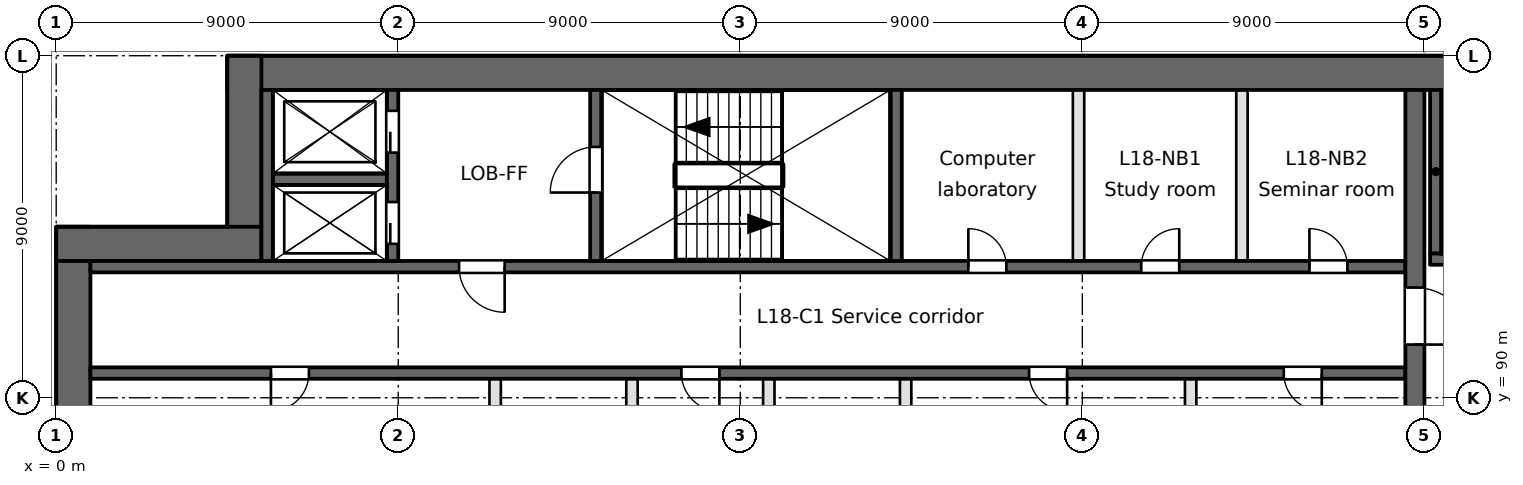
"""IFC4 building model, lengths in metres.
Left out: names, types, materials, properties, quantities, classifications, styles, units other than length and angle.
Written with IfcOpenShell. Run it as: python <this file> out.ifc"""

import sys

from ifc_helpers import new_model, si_unit, direction, frame, frame_2d, origin, place, context, subcontext, project, spatial, rectangle, extrude, element, fill, save


model = new_model("IFC4")
c1 = context("Model", 3, precision=1e-05, world=origin(), true_north=direction((0.0, 1.0)))
c2 = subcontext(c1, "Body", "Model", "MODEL_VIEW")
j1 = project(units=[si_unit("LENGTHUNIT", "METRE"), si_unit("PLANEANGLEUNIT", "RADIAN")], contexts=[c1])
p1 = place(None, origin())
s1 = spatial("IfcSite", under=j1, at=p1, CompositionType="ELEMENT")
p2 = place(p1, origin())
s2 = spatial("IfcBuilding", under=s1, at=p2, CompositionType="ELEMENT")
p3 = place(p2, frame((0.0, 0.0, 76.5)))
s3 = spatial("IfcBuildingStorey", under=s2, at=p3, CompositionType="ELEMENT", Elevation=76.5)
p4 = place(p3, frame((0.45, 94.5, 0.0), z_axis=(0.0, 0.0, 1.0), x_axis=(0.0, -1.0, 0.0)))
e1 = element("IfcWall", 1, at=p4, inside=s3, PredefinedType="SHEAR", context=c2, shape_type="SweptSolid", body=[
    extrude(rectangle(XDim=66.187, YDim=0.9, at=frame_2d((33.094, 0.0))), origin(), (0.0, 0.0, 1.0), 3.7),
])
p5 = place(p3, frame((94.5, 98.55, 0.0), z_axis=(0.0, 0.0, 1.0), x_axis=(-1.0, 0.0, 0.0)))
e2 = element("IfcWall", 2, at=p5, inside=s3, PredefinedType="SHEAR", context=c2, shape_type="SweptSolid", body=[
    extrude(rectangle(XDim=90.0, YDim=0.9, at=frame_2d((45.0, 0.0))), origin(), (0.0, 0.0, 1.0), 3.25),
])
for number, where, z_axis, x_axis in (
    (3, (4.95, 99.0, 0.0), (0.0, 0.0, 1.0), (0.0, -1.0, 0.0)),
    (4, (5.4, 94.05, 0.0), (0.0, 0.0, 1.0), (-1.0, 0.0, 0.0)),
):
    element("IfcWall", number, at=place(p3, frame(where, z_axis=z_axis, x_axis=x_axis)), inside=s3, PredefinedType="SHEAR", context=c2, shape_type="SweptSolid", body=[
        extrude(rectangle(XDim=5.4, YDim=0.9, at=frame_2d((2.7, 0.0))), origin(), (0.0, 0.0, 1.0), 3.7),
    ])
p6 = place(p3, frame((0.9, 90.65, -0.4), z_axis=(0.0, 0.0, 1.0), x_axis=(1.0, 0.0, 0.0)))
e5 = element("IfcWall", 5, at=p6, inside=s3, PredefinedType="SOLIDWALL", context=c2, shape_type="SweptSolid", body=[
    extrude(rectangle(XDim=34.6, YDim=0.3, at=frame_2d((17.3, 0.0))), origin(), (0.0, 0.0, 1.0), 3.65),
])
p7 = place(p6, frame((4.75, 0.0, 0.4)))
e6 = element("IfcOpeningElement", 6, at=p7, cuts=e5, PredefinedType="OPENING", context=c2, shape_type="SweptSolid", body=[
    extrude(rectangle(XDim=1.0, YDim=2.1, at=frame_2d((0.5, 1.05))), frame((0.0, 0.15, 0.0), z_axis=(0.0, -1.0, 0.0), x_axis=(1.0, 0.0, 0.0)), (0.0, 0.0, 1.0), 0.3),
])
p8 = place(p6, frame((24.7, 0.0, 0.4)))
e7 = element("IfcOpeningElement", 7, at=p8, cuts=e5, PredefinedType="OPENING", context=c2, shape_type="SweptSolid", body=[
    extrude(rectangle(XDim=1.0, YDim=2.1, at=frame_2d((0.5, 1.05))), frame((0.0, 0.15, 0.0), z_axis=(0.0, -1.0, 0.0), x_axis=(1.0, 0.0, 0.0)), (0.0, 0.0, 1.0), 0.3),
])
p9 = place(p6, frame((15.55, 0.0, 0.4)))
e8 = element("IfcOpeningElement", 8, at=p9, cuts=e5, PredefinedType="OPENING", context=c2, shape_type="SweptSolid", body=[
    extrude(rectangle(XDim=1.0, YDim=2.1, at=frame_2d((0.5, 1.05))), frame((0.0, 0.15, 0.0), z_axis=(0.0, -1.0, 0.0), x_axis=(1.0, 0.0, 0.0)), (0.0, 0.0, 1.0), 0.3),
])
p10 = place(p6, frame((31.4, 0.0, 0.4)))
e9 = element("IfcOpeningElement", 9, at=p10, cuts=e5, PredefinedType="OPENING", context=c2, shape_type="SweptSolid", body=[
    extrude(rectangle(XDim=1.0, YDim=2.1, at=frame_2d((0.5, 1.05))), frame((0.0, 0.15, 0.0), z_axis=(0.0, -1.0, 0.0), x_axis=(1.0, 0.0, 0.0)), (0.0, 0.0, 1.0), 0.3),
])
p11 = place(p3, frame((0.9, 93.45, -0.4), z_axis=(0.0, 0.0, 1.0), x_axis=(1.0, 0.0, 0.0)))
e10 = element("IfcWall", 10, at=p11, inside=s3, PredefinedType="SOLIDWALL", context=c2, shape_type="SweptSolid", body=[
    extrude(rectangle(XDim=34.6, YDim=0.3, at=frame_2d((17.3, 0.0))), origin(), (0.0, 0.0, 1.0), 3.65),
])
p12 = place(p11, frame((9.7, 0.0, 0.4)))
e11 = element("IfcOpeningElement", 11, at=p12, cuts=e10, PredefinedType="OPENING", context=c2, shape_type="SweptSolid", body=[
    extrude(rectangle(XDim=1.2, YDim=2.1, at=frame_2d((0.6, 1.05))), frame((0.0, 0.15, 0.0), z_axis=(0.0, -1.0, 0.0), x_axis=(1.0, 0.0, 0.0)), (0.0, 0.0, 1.0), 0.3),
])
p13 = place(p11, frame((23.1, 0.0, 0.4)))
e12 = element("IfcOpeningElement", 12, at=p13, cuts=e10, PredefinedType="OPENING", context=c2, shape_type="SweptSolid", body=[
    extrude(rectangle(XDim=1.0, YDim=2.1, at=frame_2d((0.5, 1.05))), frame((0.0, 0.15, 0.0), z_axis=(0.0, -1.0, 0.0), x_axis=(1.0, 0.0, 0.0)), (0.0, 0.0, 1.0), 0.3),
])
p14 = place(p11, frame((27.65, 0.0, 0.4)))
e13 = element("IfcOpeningElement", 13, at=p14, cuts=e10, PredefinedType="OPENING", context=c2, shape_type="SweptSolid", body=[
    extrude(rectangle(XDim=1.0, YDim=2.1, at=frame_2d((0.5, 1.05))), frame((0.0, 0.15, 0.0), z_axis=(0.0, -1.0, 0.0), x_axis=(1.0, 0.0, 0.0)), (0.0, 0.0, 1.0), 0.3),
])
p15 = place(p11, frame((32.075, 0.0, 0.4)))
e14 = element("IfcOpeningElement", 14, at=p15, cuts=e10, PredefinedType="OPENING", context=c2, shape_type="SweptSolid", body=[
    extrude(rectangle(XDim=1.0, YDim=2.1, at=frame_2d((0.5, 1.05))), frame((0.0, 0.15, 0.0), z_axis=(0.0, -1.0, 0.0), x_axis=(1.0, 0.0, 0.0)), (0.0, 0.0, 1.0), 0.3),
])
p16 = place(p3, frame((36.15, 93.65, -0.4), z_axis=(0.0, 0.0, 1.0), x_axis=(1.0, 0.0, 0.0)))
e15 = element("IfcWall", 15, at=p16, inside=s3, PredefinedType="SOLIDWALL", context=c2, shape_type="SweptSolid", body=[
    extrude(rectangle(XDim=8.2, YDim=0.3, at=frame_2d((4.1, 0.0))), origin(), (0.0, 0.0, 1.0), 3.65),
])
p17 = place(p16, frame((0.7, 0.0, 0.4)))
e16 = element("IfcOpeningElement", 16, at=p17, cuts=e15, PredefinedType="OPENING", context=c2, shape_type="SweptSolid", body=[
    extrude(rectangle(XDim=1.2, YDim=2.1, at=frame_2d((0.6, 1.05))), frame((0.0, 0.15, 0.0), z_axis=(0.0, -1.0, 0.0), x_axis=(1.0, 0.0, 0.0)), (0.0, 0.0, 1.0), 0.3),
])
p18 = place(p3, frame((5.7, 95.75, -0.4), z_axis=(0.0, 0.0, 1.0), x_axis=(1.0, 0.0, 0.0)))
e17 = element("IfcWall", 17, at=p18, inside=s3, PredefinedType="SOLIDWALL", context=c2, shape_type="SweptSolid", body=[
    extrude(rectangle(XDim=3.0, YDim=0.3, at=frame_2d((1.5, 0.0))), origin(), (0.0, 0.0, 1.0), 3.65),
])
p19 = place(p3, frame((5.55, 93.6, -0.4), z_axis=(0.0, 0.0, 1.0), x_axis=(0.0, 1.0, 0.0)))
e18 = element("IfcWall", 18, at=p19, inside=s3, PredefinedType="SOLIDWALL", context=c2, shape_type="SweptSolid", body=[
    extrude(rectangle(XDim=4.5, YDim=0.3, at=frame_2d((2.25, 0.0))), origin(), (0.0, 0.0, 1.0), 3.65),
])
p20 = place(p3, frame((8.85, 93.6, -0.4), z_axis=(0.0, 0.0, 1.0), x_axis=(0.0, 1.0, 0.0)))
e19 = element("IfcWall", 19, at=p20, inside=s3, PredefinedType="SOLIDWALL", context=c2, shape_type="SweptSolid", body=[
    extrude(rectangle(XDim=4.5, YDim=0.3, at=frame_2d((2.25, 0.0))), origin(), (0.0, 0.0, 1.0), 3.65),
])
p21 = place(p20, frame((0.45, 0.0, 0.4)))
e20 = element("IfcOpeningElement", 20, at=p21, cuts=e19, PredefinedType="OPENING", context=c2, shape_type="SweptSolid", body=[
    extrude(rectangle(XDim=1.1, YDim=2.1, at=frame_2d((0.55, 1.05))), frame((0.0, 0.15, 0.0), z_axis=(0.0, -1.0, 0.0), x_axis=(1.0, 0.0, 0.0)), (0.0, 0.0, 1.0), 0.3),
])
p22 = place(p20, frame((2.85, 0.0, 0.4)))
e21 = element("IfcOpeningElement", 21, at=p22, cuts=e19, PredefinedType="OPENING", context=c2, shape_type="SweptSolid", body=[
    extrude(rectangle(XDim=1.1, YDim=2.1, at=frame_2d((0.55, 1.05))), frame((0.0, 0.15, 0.0), z_axis=(0.0, -1.0, 0.0), x_axis=(1.0, 0.0, 0.0)), (0.0, 0.0, 1.0), 0.3),
])
p23 = place(p3, frame((11.55, 87.95, 0.0), z_axis=(0.0, 0.0, 1.0), x_axis=(0.0, 1.0, 0.0)))
e22 = element("IfcWall", 22, at=p23, inside=s3, PredefinedType="PARTITIONING", context=c2, shape_type="SweptSolid", body=[
    extrude(rectangle(XDim=2.55, YDim=0.3, at=frame_2d((1.275, 0.0))), origin(), (0.0, 0.0, 1.0), 3.25),
])
p24 = place(p3, frame((14.2, 93.6, -0.4), z_axis=(0.0, 0.0, 1.0), x_axis=(0.0, 1.0, 0.0)))
e23 = element("IfcWall", 23, at=p24, inside=s3, PredefinedType="SOLIDWALL", context=c2, shape_type="SweptSolid", body=[
    extrude(rectangle(XDim=4.5, YDim=0.3, at=frame_2d((2.25, 0.0))), origin(), (0.0, 0.0, 1.0), 3.65),
])
p25 = place(p24, frame((1.8, 0.0, 0.4)))
e24 = element("IfcOpeningElement", 24, at=p25, cuts=e23, PredefinedType="OPENING", context=c2, shape_type="SweptSolid", body=[
    extrude(rectangle(XDim=1.2, YDim=2.1, at=frame_2d((0.6, 1.05))), frame((0.0, 0.15, 0.0), z_axis=(0.0, -1.0, 0.0), x_axis=(1.0, 0.0, 0.0)), (0.0, 0.0, 1.0), 0.3),
])
for number, where, z_axis, x_axis in (
    (25, (15.15, 77.55, 0.0), (0.0, 0.0, 1.0), (0.0, 1.0, 0.0)),
    (26, (18.75, 77.55, 0.0), (0.0, 0.0, 1.0), (0.0, 1.0, 0.0)),
):
    element("IfcWall", number, at=place(p3, frame(where, z_axis=z_axis, x_axis=x_axis)), inside=s3, PredefinedType="PARTITIONING", context=c2, shape_type="SweptSolid", body=[
        extrude(rectangle(XDim=12.95, YDim=0.3, at=frame_2d((6.475, 0.0))), origin(), (0.0, 0.0, 1.0), 3.25),
    ])
p26 = place(p3, frame((22.1, 93.6, -0.4), z_axis=(0.0, 0.0, 1.0), x_axis=(0.0, 1.0, 0.0)))
e27 = element("IfcWall", 27, at=p26, inside=s3, PredefinedType="SOLIDWALL", context=c2, shape_type="SweptSolid", body=[
    extrude(rectangle(XDim=4.5, YDim=0.3, at=frame_2d((2.25, 0.0))), origin(), (0.0, 0.0, 1.0), 3.65),
])
p27 = place(p3, frame((22.35, 87.95, 0.0), z_axis=(0.0, 0.0, 1.0), x_axis=(0.0, 1.0, 0.0)))
e28 = element("IfcWall", 28, at=p27, inside=s3, PredefinedType="PARTITIONING", context=c2, shape_type="SweptSolid", body=[
    extrude(rectangle(XDim=2.55, YDim=0.3, at=frame_2d((1.275, 0.0))), origin(), (0.0, 0.0, 1.0), 3.25),
])
p28 = place(p3, frame((26.9, 93.6, 0.0), z_axis=(0.0, 0.0, 1.0), x_axis=(0.0, 1.0, 0.0)))
e29 = element("IfcWall", 29, at=p28, inside=s3, PredefinedType="PARTITIONING", context=c2, shape_type="SweptSolid", body=[
    extrude(rectangle(XDim=4.5, YDim=0.3, at=frame_2d((2.25, 0.0))), origin(), (0.0, 0.0, 1.0), 3.25),
])
p29 = place(p3, frame((29.85, 87.95, 0.0), z_axis=(0.0, 0.0, 1.0), x_axis=(0.0, 1.0, 0.0)))
e30 = element("IfcWall", 30, at=p29, inside=s3, PredefinedType="PARTITIONING", context=c2, shape_type="SweptSolid", body=[
    extrude(rectangle(XDim=2.55, YDim=0.3, at=frame_2d((1.275, 0.0))), origin(), (0.0, 0.0, 1.0), 3.25),
])
p30 = place(p3, frame((31.2, 93.6, 0.0), z_axis=(0.0, 0.0, 1.0), x_axis=(0.0, 1.0, 0.0)))
e31 = element("IfcWall", 31, at=p30, inside=s3, PredefinedType="PARTITIONING", context=c2, shape_type="SweptSolid", body=[
    extrude(rectangle(XDim=4.5, YDim=0.3, at=frame_2d((2.25, 0.0))), origin(), (0.0, 0.0, 1.0), 3.25),
])
p31 = place(p3, frame((35.75, 63.5, -0.4), z_axis=(0.0, 0.0, 1.0), x_axis=(0.0, 1.0, 0.0)))
e32 = element("IfcWall", 32, at=p31, inside=s3, PredefinedType="SOLIDWALL", context=c2, shape_type="SweptSolid", body=[
    extrude(rectangle(XDim=34.6, YDim=0.5, at=frame_2d((17.3, 0.0))), origin(), (0.0, 0.0, 1.0), 3.65),
])
p32 = place(p31, frame((9.7, 0.0, 0.4)))
e33 = element("IfcOpeningElement", 33, at=p32, cuts=e32, PredefinedType="OPENING", context=c2, shape_type="SweptSolid", body=[
    extrude(rectangle(XDim=2.4, YDim=2.1, at=frame_2d((1.2, 1.05))), frame((0.0, 0.25, 0.0), z_axis=(0.0, -1.0, 0.0), x_axis=(1.0, 0.0, 0.0)), (0.0, 0.0, 1.0), 0.5),
])
p33 = place(p31, frame((27.9, 0.0, 0.4)))
e34 = element("IfcOpeningElement", 34, at=p33, cuts=e32, PredefinedType="OPENING", context=c2, shape_type="SweptSolid", body=[
    extrude(rectangle(XDim=1.5, YDim=2.1, at=frame_2d((0.75, 1.05))), frame((0.0, 0.25, 0.0), z_axis=(0.0, -1.0, 0.0), x_axis=(1.0, 0.0, 0.0)), (0.0, 0.0, 1.0), 0.5),
])
p34 = place(p31, frame((1.5, 0.0, 0.4)))
e35 = element("IfcOpeningElement", 35, at=p34, cuts=e32, PredefinedType="OPENING", context=c2, shape_type="SweptSolid", body=[
    extrude(rectangle(XDim=1.2, YDim=2.1, at=frame_2d((0.6, 1.05))), frame((0.0, 0.25, 0.0), z_axis=(0.0, -1.0, 0.0), x_axis=(1.0, 0.0, 0.0)), (0.0, 0.0, 1.0), 0.5),
])
p35 = place(p3, frame((36.3, 93.8, -0.4), z_axis=(0.0, 0.0, 1.0), x_axis=(0.0, 1.0, 0.0)))
e36 = element("IfcWall", 36, at=p35, inside=s3, PredefinedType="SOLIDWALL", context=c2, shape_type="SweptSolid", body=[
    extrude(rectangle(XDim=4.3, YDim=0.3, at=frame_2d((2.15, 0.0))), origin(), (0.0, 0.0, 1.0), 3.65),
])
p36 = place(p21, origin())
e37 = element("IfcDoor", 37, at=p36, inside=s3, OperationType="SLIDING_TO_RIGHT", PredefinedType="DOOR", context=c2, shape_type="SweptSolid", body=[
    extrude(rectangle(XDim=1.1, YDim=2.1, at=frame_2d((0.55, 1.05))), frame((0.0, 0.025, 0.0), z_axis=(0.0, -1.0, 0.0), x_axis=(1.0, 0.0, 0.0)), (0.0, 0.0, 1.0), 0.05),
])
fill(e20, e37)
p37 = place(p22, origin())
e38 = element("IfcDoor", 38, at=p37, inside=s3, OperationType="SLIDING_TO_LEFT", PredefinedType="DOOR", context=c2, shape_type="SweptSolid", body=[
    extrude(rectangle(XDim=1.1, YDim=2.1, at=frame_2d((0.55, 1.05))), frame((0.0, 0.025, 0.0), z_axis=(0.0, -1.0, 0.0), x_axis=(1.0, 0.0, 0.0)), (0.0, 0.0, 1.0), 0.05),
])
fill(e21, e38)
p38 = place(p12, frame((1.2, 0.0, 0.0), z_axis=(0.0, 0.0, 1.0), x_axis=(-1.0, 0.0, 0.0)))
e39 = element("IfcDoor", 39, at=p38, inside=s3, OperationType="SINGLE_SWING_LEFT", PredefinedType="DOOR", context=c2, shape_type="SweptSolid", body=[
    extrude(rectangle(XDim=1.2, YDim=2.1, at=frame_2d((0.6, 1.05))), frame((0.0, 0.025, 0.0), z_axis=(0.0, -1.0, 0.0), x_axis=(1.0, 0.0, 0.0)), (0.0, 0.0, 1.0), 0.05),
])
fill(e11, e39)
p39 = place(p33, frame((1.5, 0.0, 0.0), z_axis=(0.0, 0.0, 1.0), x_axis=(-1.0, 0.0, 0.0)))
e40 = element("IfcDoor", 40, at=p39, inside=s3, OperationType="SINGLE_SWING_RIGHT", PredefinedType="DOOR", context=c2, shape_type="SweptSolid", body=[
    extrude(rectangle(XDim=1.5, YDim=2.1, at=frame_2d((0.75, 1.05))), frame((0.0, 0.025, 0.0), z_axis=(0.0, -1.0, 0.0), x_axis=(1.0, 0.0, 0.0)), (0.0, 0.0, 1.0), 0.05),
])
fill(e34, e40)
p40 = place(p25, origin())
e41 = element("IfcDoor", 41, at=p40, inside=s3, OperationType="SINGLE_SWING_LEFT", PredefinedType="DOOR", context=c2, shape_type="SweptSolid", body=[
    extrude(rectangle(XDim=1.2, YDim=2.1, at=frame_2d((0.6, 1.05))), frame((0.0, 0.025, 0.0), z_axis=(0.0, -1.0, 0.0), x_axis=(1.0, 0.0, 0.0)), (0.0, 0.0, 1.0), 0.05),
])
fill(e24, e41)
p41 = place(p7, frame((1.0, 0.0, 0.0), z_axis=(0.0, 0.0, 1.0), x_axis=(-1.0, 0.0, 0.0)))
e42 = element("IfcDoor", 42, at=p41, inside=s3, OperationType="SINGLE_SWING_RIGHT", PredefinedType="DOOR", context=c2, shape_type="SweptSolid", body=[
    extrude(rectangle(XDim=1.0, YDim=2.1, at=frame_2d((0.5, 1.05))), frame((0.0, 0.025, 0.0), z_axis=(0.0, -1.0, 0.0), x_axis=(1.0, 0.0, 0.0)), (0.0, 0.0, 1.0), 0.05),
])
fill(e6, e42)
p42 = place(p8, frame((1.0, 0.0, 0.0), z_axis=(0.0, 0.0, 1.0), x_axis=(-1.0, 0.0, 0.0)))
e43 = element("IfcDoor", 43, at=p42, inside=s3, OperationType="SINGLE_SWING_LEFT", PredefinedType="DOOR", context=c2, shape_type="SweptSolid", body=[
    extrude(rectangle(XDim=1.0, YDim=2.1, at=frame_2d((0.5, 1.05))), frame((0.0, 0.025, 0.0), z_axis=(0.0, -1.0, 0.0), x_axis=(1.0, 0.0, 0.0)), (0.0, 0.0, 1.0), 0.05),
])
fill(e7, e43)
p43 = place(p9, frame((1.0, 0.0, 0.0), z_axis=(0.0, 0.0, 1.0), x_axis=(-1.0, 0.0, 0.0)))
e44 = element("IfcDoor", 44, at=p43, inside=s3, OperationType="SINGLE_SWING_LEFT", PredefinedType="DOOR", context=c2, shape_type="SweptSolid", body=[
    extrude(rectangle(XDim=1.0, YDim=2.1, at=frame_2d((0.5, 1.05))), frame((0.0, 0.025, 0.0), z_axis=(0.0, -1.0, 0.0), x_axis=(1.0, 0.0, 0.0)), (0.0, 0.0, 1.0), 0.05),
])
fill(e8, e44)
p44 = place(p10, frame((1.0, 0.0, 0.0), z_axis=(0.0, 0.0, 1.0), x_axis=(-1.0, 0.0, 0.0)))
e45 = element("IfcDoor", 45, at=p44, inside=s3, OperationType="SINGLE_SWING_LEFT", PredefinedType="DOOR", context=c2, shape_type="SweptSolid", body=[
    extrude(rectangle(XDim=1.0, YDim=2.1, at=frame_2d((0.5, 1.05))), frame((0.0, 0.025, 0.0), z_axis=(0.0, -1.0, 0.0), x_axis=(1.0, 0.0, 0.0)), (0.0, 0.0, 1.0), 0.05),
])
fill(e9, e45)
p45 = place(p13, origin())
e46 = element("IfcDoor", 46, at=p45, inside=s3, OperationType="SINGLE_SWING_LEFT", PredefinedType="DOOR", context=c2, shape_type="SweptSolid", body=[
    extrude(rectangle(XDim=1.0, YDim=2.1, at=frame_2d((0.5, 1.05))), frame((0.0, 0.025, 0.0), z_axis=(0.0, -1.0, 0.0), x_axis=(1.0, 0.0, 0.0)), (0.0, 0.0, 1.0), 0.05),
])
fill(e12, e46)
p46 = place(p14, origin())
e47 = element("IfcDoor", 47, at=p46, inside=s3, OperationType="SINGLE_SWING_RIGHT", PredefinedType="DOOR", context=c2, shape_type="SweptSolid", body=[
    extrude(rectangle(XDim=1.0, YDim=2.1, at=frame_2d((0.5, 1.05))), frame((0.0, 0.025, 0.0), z_axis=(0.0, -1.0, 0.0), x_axis=(1.0, 0.0, 0.0)), (0.0, 0.0, 1.0), 0.05),
])
fill(e13, e47)
p47 = place(p15, origin())
e48 = element("IfcDoor", 48, at=p47, inside=s3, OperationType="SINGLE_SWING_LEFT", PredefinedType="DOOR", context=c2, shape_type="SweptSolid", body=[
    extrude(rectangle(XDim=1.0, YDim=2.1, at=frame_2d((0.5, 1.05))), frame((0.0, 0.025, 0.0), z_axis=(0.0, -1.0, 0.0), x_axis=(1.0, 0.0, 0.0)), (0.0, 0.0, 1.0), 0.05),
])
fill(e14, e48)
save(model, sys.argv[1])
